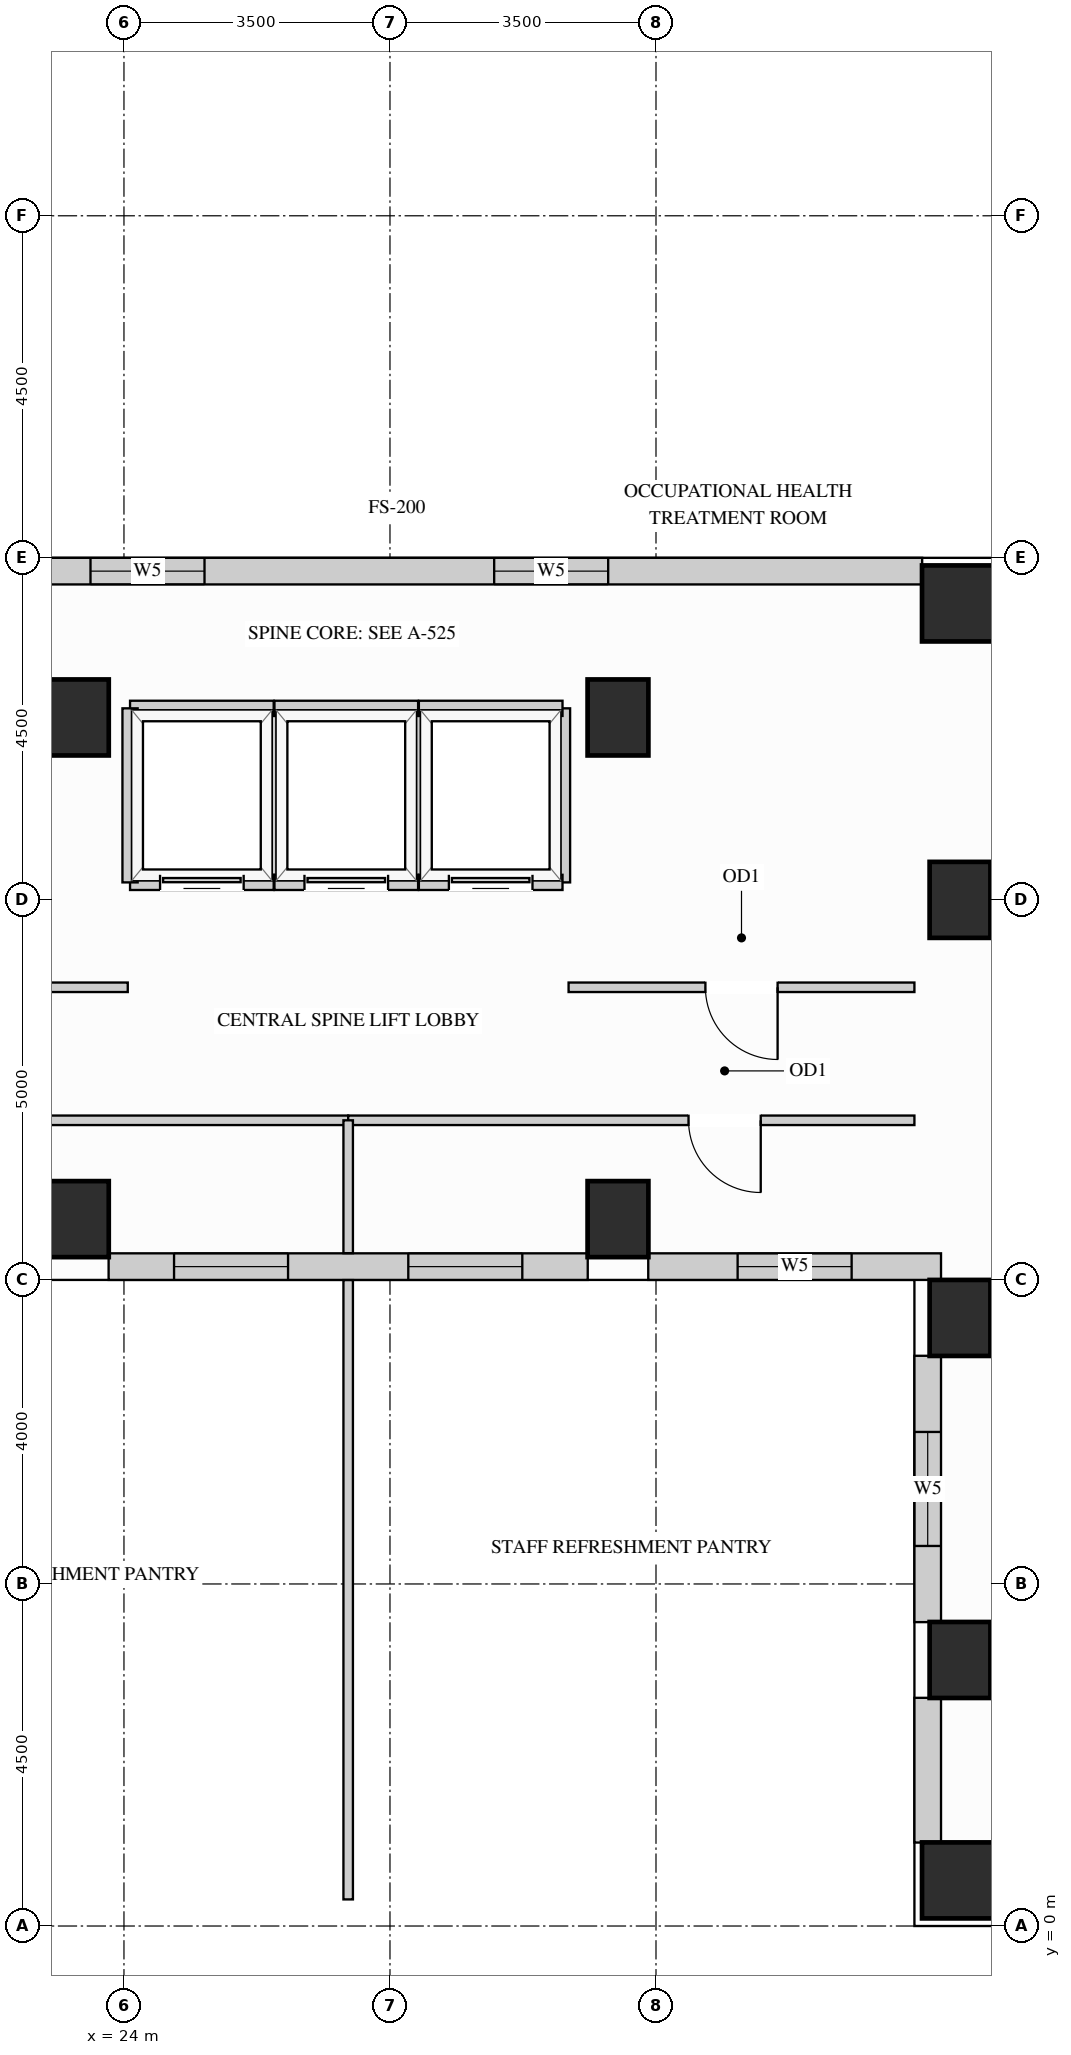
"""IFC4 building model, lengths in metres.
Left out: names, types, materials, properties, quantities, classifications, styles, units other than length and angle.
Written with IfcOpenShell. Run it as: python <this file> out.ifc"""

import sys

from ifc_helpers import new_model, si_unit, direction, frame, frame_2d, origin, origin_2d, place, context, subcontext, project, spatial, rectangle, extrude, source, transform, mapped, element, fill, save


model = new_model("IFC4")
c1 = context("Model", 3, precision=1e-05, world=origin(), true_north=direction((0.0, 1.0)))
c2 = subcontext(c1, "Body", "Model", "MODEL_VIEW")
j1 = project(units=[si_unit("LENGTHUNIT", "METRE"), si_unit("PLANEANGLEUNIT", "RADIAN")], contexts=[c1])
p1 = place(None, origin())
s1 = spatial("IfcSite", under=j1, at=p1, CompositionType="ELEMENT")
p2 = place(p1, origin())
s2 = spatial("IfcBuilding", under=s1, at=p2, CompositionType="ELEMENT")
p3 = place(p2, frame((0.0, 0.0, 182.7)))
s3 = spatial("IfcBuildingStorey", under=s2, at=p3, CompositionType="ELEMENT", Elevation=182.7)
m1 = source(origin(), c2, "Body", "SweptSolid", [
    extrude(rectangle(XDim=0.8, YDim=1.0, at=origin_2d()), origin(), (0.0, 0.0, 1.0), 3.4),
])
for number, where, z_axis, x_axis in (
    (1, (35.0, 13.5, 0.0), (0.0, 0.0, 1.0), (1.0, 0.0, 0.0)),
    (2, (35.0, 3.5, 0.0), (0.0, 0.0, 1.0), (1.0, 0.0, 0.0)),
    (3, (35.0, 8.0, 0.0), (0.0, 0.0, 1.0), (1.0, 0.0, 0.0)),
    (4, (23.4, 15.9, 0.0), (0.0, 0.0, 1.0), (1.0, 0.0, 0.0)),
    (5, (23.4, 9.3, 0.0), (0.0, 0.0, 1.0), (1.0, 0.0, 0.0)),
    (6, (30.5, 15.9, 0.0), (0.0, 0.0, 1.0), (1.0, 0.0, 0.0)),
    (7, (30.5, 9.3, 0.0), (0.0, 0.0, 1.0), (1.0, 0.0, 0.0)),
):
    element("IfcColumn", number, at=place(p3, frame(where, z_axis=z_axis, x_axis=x_axis)), inside=s3, PredefinedType="COLUMN", context=c2, shape_type="MappedRepresentation", body=[
        mapped(m1, transform((0.0, 0.0, 0.0), x_axis=(1.0, 0.0, 0.0), y_axis=(0.0, 1.0, 0.0), z_axis=(0.0, 0.0, 1.0))),
    ])
m2 = source(origin(), c2, "Body", "SweptSolid", [
    extrude(rectangle(XDim=1.0, YDim=1.0, at=origin_2d()), origin(), (0.0, 0.0, 1.0), 3.4),
])
for number, where, z_axis, x_axis in (
    (8, (35.0, 17.4, 0.0), (0.0, 0.0, 1.0), (1.0, 0.0, 0.0)),
    (9, (35.0, 0.6, 0.0), (0.0, 0.0, 1.0), (1.0, 0.0, 0.0)),
):
    element("IfcColumn", number, at=place(p3, frame(where, z_axis=z_axis, x_axis=x_axis)), inside=s3, PredefinedType="COLUMN", context=c2, shape_type="MappedRepresentation", body=[
        mapped(m2, transform((0.0, 0.0, 0.0), x_axis=(1.0, 0.0, 0.0), y_axis=(0.0, 1.0, 0.0), z_axis=(0.0, 0.0, 1.0))),
    ])
p4 = place(p3, frame((23.798, 8.675, 0.0), z_axis=(0.0, 0.0, 1.0), x_axis=(1.0, 0.0, 0.0)))
e10 = element("IfcWall", 10, at=p4, inside=s3, PredefinedType="SOLIDWALL", context=c2, shape_type="SweptSolid", body=[
    extrude(rectangle(XDim=6.304, YDim=0.35, at=frame_2d((3.152, 0.0))), origin(), (0.0, 0.0, 1.0), 3.385),
])
p5 = place(p4, frame((0.861, 0.0, 0.78)))
e11 = element("IfcOpeningElement", 11, at=p5, cuts=e10, PredefinedType="OPENING", context=c2, shape_type="SweptSolid", body=[
    extrude(rectangle(XDim=1.5, YDim=2.0, at=frame_2d((0.75, 1.0))), frame((0.0, 0.185, 0.0), z_axis=(0.0, -1.0, 0.0), x_axis=(1.0, 0.0, 0.0)), (0.0, 0.0, 1.0), 0.37),
])
p6 = place(p4, frame((3.943, 0.0, 0.78)))
e12 = element("IfcOpeningElement", 12, at=p6, cuts=e10, PredefinedType="OPENING", context=c2, shape_type="SweptSolid", body=[
    extrude(rectangle(XDim=1.5, YDim=2.0, at=frame_2d((0.75, 1.0))), frame((0.0, 0.185, 0.0), z_axis=(0.0, -1.0, 0.0), x_axis=(1.0, 0.0, 0.0)), (0.0, 0.0, 1.0), 0.37),
])
p7 = place(p3, frame((30.898, 8.675, 0.0), z_axis=(0.0, 0.0, 1.0), x_axis=(1.0, 0.0, 0.0)))
e13 = element("IfcWall", 13, at=p7, inside=s3, PredefinedType="SOLIDWALL", context=c2, shape_type="SweptSolid", body=[
    extrude(rectangle(XDim=3.852, YDim=0.35, at=frame_2d((1.926, 0.0))), origin(), (0.0, 0.0, 1.0), 3.385),
])
p8 = place(p7, frame((1.176, 0.0, 0.78)))
e14 = element("IfcOpeningElement", 14, at=p8, cuts=e13, PredefinedType="OPENING", context=c2, shape_type="SweptSolid", body=[
    extrude(rectangle(XDim=1.5, YDim=2.0, at=frame_2d((0.75, 1.0))), frame((0.0, 0.185, 0.0), z_axis=(0.0, -1.0, 0.0), x_axis=(1.0, 0.0, 0.0)), (0.0, 0.0, 1.0), 0.37),
])
p9 = place(p3, frame((34.575, 7.502, 0.0), z_axis=(0.0, 0.0, 1.0), x_axis=(0.0, -1.0, 0.0)))
e15 = element("IfcWall", 15, at=p9, inside=s3, PredefinedType="SOLIDWALL", context=c2, shape_type="SweptSolid", body=[
    extrude(rectangle(XDim=3.504, YDim=0.35, at=frame_2d((1.752, 0.0))), origin(), (0.0, 0.0, 1.0), 2.612),
])
p10 = place(p9, frame((1.002, 0.0, 0.78)))
e16 = element("IfcOpeningElement", 16, at=p10, cuts=e15, PredefinedType="OPENING", context=c2, shape_type="SweptSolid", body=[
    extrude(rectangle(XDim=1.5, YDim=1.652, at=frame_2d((0.75, 0.826))), frame((0.0, 0.185, 0.0), z_axis=(0.0, -1.0, 0.0), x_axis=(1.0, 0.0, 0.0)), (0.0, 0.0, 1.0), 0.37),
])
m3 = source(origin(), c2, "Body", "SweptSolid", [
    extrude(rectangle(XDim=1.904, YDim=0.35, at=frame_2d((0.952, 0.0))), origin(), (0.0, 0.0, 1.0), 2.612),
])
p11 = place(p3, frame((34.575, 3.002, 0.0), z_axis=(0.0, 0.0, 1.0), x_axis=(0.0, -1.0, 0.0)))
e17 = element("IfcWall", 17, at=p11, inside=s3, PredefinedType="SOLIDWALL", context=c2, shape_type="MappedRepresentation", body=[
    mapped(m3, transform((0.0, 0.0, 0.0), x_axis=(1.0, 0.0, 0.0), y_axis=(0.0, 1.0, 0.0), z_axis=(0.0, 0.0, 1.0))),
])
p12 = place(p3, frame((34.502, 17.825, 0.0), z_axis=(0.0, 0.0, 1.0), x_axis=(-1.0, 0.0, 0.0)))
e18 = element("IfcWall", 18, at=p12, inside=s3, PredefinedType="SOLIDWALL", context=c2, shape_type="SweptSolid", body=[
    extrude(rectangle(XDim=15.104, YDim=0.35, at=frame_2d((7.552, 0.0))), origin(), (0.0, 0.0, 1.0), 3.385),
])
p13 = place(p12, frame((4.131, 0.0, 0.78)))
e19 = element("IfcOpeningElement", 19, at=p13, cuts=e18, PredefinedType="OPENING", context=c2, shape_type="SweptSolid", body=[
    extrude(rectangle(XDim=1.5, YDim=2.0, at=frame_2d((0.75, 1.0))), frame((0.0, 0.185, 0.0), z_axis=(0.0, -1.0, 0.0), x_axis=(1.0, 0.0, 0.0)), (0.0, 0.0, 1.0), 0.37),
])
p14 = place(p12, frame((9.442, 0.0, 0.78)))
e20 = element("IfcOpeningElement", 20, at=p14, cuts=e18, PredefinedType="OPENING", context=c2, shape_type="SweptSolid", body=[
    extrude(rectangle(XDim=1.5, YDim=2.0, at=frame_2d((0.75, 1.0))), frame((0.0, 0.185, 0.0), z_axis=(0.0, -1.0, 0.0), x_axis=(1.0, 0.0, 0.0)), (0.0, 0.0, 1.0), 0.37),
])
p15 = place(p3, frame((29.85, 12.35, 0.0), z_axis=(0.0, 0.0, 1.0), x_axis=(1.0, 0.0, 0.0)))
e21 = element("IfcWall", 21, at=p15, inside=s3, PredefinedType="PARTITIONING", context=c2, shape_type="SweptSolid", body=[
    extrude(rectangle(XDim=4.55, YDim=0.125, at=frame_2d((2.275, 0.0))), origin(), (0.0, 0.0, 1.0), 3.385),
])
p16 = place(p15, frame((1.8, 0.0, 0.0)))
e22 = element("IfcOpeningElement", 22, at=p16, cuts=e21, PredefinedType="OPENING", context=c2, shape_type="SweptSolid", body=[
    extrude(rectangle(XDim=0.95, YDim=2.15, at=frame_2d((0.475, 1.075))), frame((0.0, 0.073, 0.0), z_axis=(0.0, -1.0, 0.0), x_axis=(1.0, 0.0, 0.0)), (0.0, 0.0, 1.0), 0.145),
])
p17 = place(p3, frame((19.5, 12.35, 0.0), z_axis=(0.0, 0.0, 1.0), x_axis=(1.0, 0.0, 0.0)))
e23 = element("IfcWall", 23, at=p17, inside=s3, PredefinedType="PARTITIONING", context=c2, shape_type="SweptSolid", body=[
    extrude(rectangle(XDim=4.55, YDim=0.125, at=frame_2d((2.275, 0.0))), origin(), (0.0, 0.0, 1.0), 3.385),
])
p18 = place(p17, frame((1.8, 0.0, 0.0)))
e24 = element("IfcOpeningElement", 24, at=p18, cuts=e23, PredefinedType="OPENING", context=c2, shape_type="SweptSolid", body=[
    extrude(rectangle(XDim=0.95, YDim=2.15, at=frame_2d((0.475, 1.075))), frame((0.0, 0.073, 0.0), z_axis=(0.0, -1.0, 0.0), x_axis=(1.0, 0.0, 0.0)), (0.0, 0.0, 1.0), 0.145),
])
p19 = place(p3, frame((19.5, 10.6, 0.0), z_axis=(0.0, 0.0, 1.0), x_axis=(1.0, 0.0, 0.0)))
e25 = element("IfcWall", 25, at=p19, inside=s3, PredefinedType="PARTITIONING", context=c2, shape_type="SweptSolid", body=[
    extrude(rectangle(XDim=7.45, YDim=0.125, at=frame_2d((3.725, 0.0))), origin(), (0.0, 0.0, 1.0), 3.385),
])
p20 = place(p19, frame((2.022, 0.0, 0.0)))
e26 = element("IfcOpeningElement", 26, at=p20, cuts=e25, PredefinedType="OPENING", context=c2, shape_type="SweptSolid", body=[
    extrude(rectangle(XDim=0.95, YDim=2.15, at=frame_2d((0.475, 1.075))), frame((0.0, 0.073, 0.0), z_axis=(0.0, -1.0, 0.0), x_axis=(1.0, 0.0, 0.0)), (0.0, 0.0, 1.0), 0.145),
])
p21 = place(p3, frame((26.95, 10.6, 0.0), z_axis=(0.0, 0.0, 1.0), x_axis=(1.0, 0.0, 0.0)))
e27 = element("IfcWall", 27, at=p21, inside=s3, PredefinedType="PARTITIONING", context=c2, shape_type="SweptSolid", body=[
    extrude(rectangle(XDim=7.45, YDim=0.125, at=frame_2d((3.725, 0.0))), origin(), (0.0, 0.0, 1.0), 3.385),
])
p22 = place(p21, frame((4.478, 0.0, 0.0)))
e28 = element("IfcOpeningElement", 28, at=p22, cuts=e27, PredefinedType="OPENING", context=c2, shape_type="SweptSolid", body=[
    extrude(rectangle(XDim=0.95, YDim=2.15, at=frame_2d((0.475, 1.075))), frame((0.0, 0.073, 0.0), z_axis=(0.0, -1.0, 0.0), x_axis=(1.0, 0.0, 0.0)), (0.0, 0.0, 1.0), 0.145),
])
m4 = source(origin(), c2, "Body", "SweptSolid", [
    extrude(rectangle(XDim=8.148, YDim=0.125, at=frame_2d((4.074, 0.0))), origin(), (0.0, 0.0, 1.0), 3.385),
])
p23 = place(p3, frame((26.95, 0.35, 0.0), z_axis=(0.0, 0.0, 1.0), x_axis=(0.0, 1.0, 0.0)))
e29 = element("IfcWall", 29, at=p23, inside=s3, PredefinedType="PARTITIONING", context=c2, shape_type="MappedRepresentation", body=[
    mapped(m4, transform((0.0, 0.0, 0.0), x_axis=(1.0, 0.0, 0.0), y_axis=(0.0, 1.0, 0.0), z_axis=(0.0, 0.0, 1.0))),
])
m5 = source(origin(), c2, "Body", "SweptSolid", [
    extrude(rectangle(XDim=1.748, YDim=0.125, at=frame_2d((0.874, 0.0))), origin(), (0.0, 0.0, 1.0), 3.385),
])
p24 = place(p3, frame((26.95, 8.852, 0.0), z_axis=(0.0, 0.0, 1.0), x_axis=(0.0, 1.0, 0.0)))
e30 = element("IfcWall", 30, at=p24, inside=s3, PredefinedType="PARTITIONING", context=c2, shape_type="MappedRepresentation", body=[
    mapped(m5, transform((0.0, 0.0, 0.0), x_axis=(1.0, 0.0, 0.0), y_axis=(0.0, 1.0, 0.0), z_axis=(0.0, 0.0, 1.0))),
])
m6 = source(origin(), c2, "Body", "SweptSolid", [
    extrude(rectangle(XDim=2.29, YDim=0.2, at=frame_2d((1.145, 0.0))), origin(), (0.0, 0.0, 1.0), 3.385),
])
p25 = place(p3, frame((25.97, 13.73, 0.0), z_axis=(0.0, 0.0, 1.0), x_axis=(0.0, 1.0, 0.0)))
e31 = element("IfcWall", 31, at=p25, inside=s3, PredefinedType="PARTITIONING", context=c2, shape_type="MappedRepresentation", body=[
    mapped(m6, transform((0.0, 0.0, 0.0), x_axis=(1.0, 0.0, 0.0), y_axis=(0.0, 1.0, 0.0), z_axis=(0.0, 0.0, 1.0))),
])
m7 = source(origin(), c2, "Body", "SweptSolid", [
    extrude(rectangle(XDim=1.89, YDim=0.2, at=frame_2d((0.945, 0.0))), origin(), (0.0, 0.0, 1.0), 2.773),
])
p26 = place(p3, frame((24.08, 16.02, 0.0), z_axis=(0.0, 0.0, 1.0), x_axis=(1.0, 0.0, 0.0)))
e32 = element("IfcWall", 32, at=p26, inside=s3, PredefinedType="PARTITIONING", context=c2, shape_type="MappedRepresentation", body=[
    mapped(m7, transform((0.0, 0.0, 0.0), x_axis=(1.0, 0.0, 0.0), y_axis=(0.0, 1.0, 0.0), z_axis=(0.0, 0.0, 1.0))),
])
p27 = place(p3, frame((24.08, 13.73, 0.0), z_axis=(0.0, 0.0, 1.0), x_axis=(1.0, 0.0, 0.0)))
e33 = element("IfcWall", 33, at=p27, inside=s3, PredefinedType="PARTITIONING", context=c2, shape_type="SweptSolid", body=[
    extrude(rectangle(XDim=1.89, YDim=0.2, at=frame_2d((0.945, 0.0))), origin(), (0.0, 0.0, 1.0), 2.466),
])
p28 = place(p27, frame((0.395, 0.0, 0.0)))
e34 = element("IfcOpeningElement", 34, at=p28, cuts=e33, PredefinedType="OPENING", context=c2, shape_type="SweptSolid", body=[
    extrude(rectangle(XDim=1.1, YDim=2.2, at=frame_2d((0.55, 1.1))), frame((0.0, 0.11, 0.0), z_axis=(0.0, -1.0, 0.0), x_axis=(1.0, 0.0, 0.0)), (0.0, 0.0, 1.0), 0.22),
])
for number, where, z_axis, x_axis in (
    (35, (24.08, 13.73, 0.0), (0.0, 0.0, 1.0), (0.0, 1.0, 0.0)),
    (36, (27.87, 13.73, 0.0), (0.0, 0.0, 1.0), (0.0, 1.0, 0.0)),
):
    element("IfcWall", number, at=place(p3, frame(where, z_axis=z_axis, x_axis=x_axis)), inside=s3, PredefinedType="PARTITIONING", context=c2, shape_type="MappedRepresentation", body=[
        mapped(m6, transform((0.0, 0.0, 0.0), x_axis=(1.0, 0.0, 0.0), y_axis=(0.0, 1.0, 0.0), z_axis=(0.0, 0.0, 1.0))),
    ])
m8 = source(origin(), c2, "Body", "SweptSolid", [
    extrude(rectangle(XDim=1.89, YDim=0.2, at=frame_2d((0.945, 0.0))), origin(), (0.0, 0.0, 1.0), 2.773),
])
p29 = place(p3, frame((25.98, 16.02, 0.0), z_axis=(0.0, 0.0, 1.0), x_axis=(1.0, 0.0, 0.0)))
e37 = element("IfcWall", 37, at=p29, inside=s3, PredefinedType="PARTITIONING", context=c2, shape_type="MappedRepresentation", body=[
    mapped(m8, transform((0.0, 0.0, 0.0), x_axis=(1.0, 0.0, 0.0), y_axis=(0.0, 1.0, 0.0), z_axis=(0.0, 0.0, 1.0))),
])
p30 = place(p3, frame((25.98, 13.73, 0.0), z_axis=(0.0, 0.0, 1.0), x_axis=(1.0, 0.0, 0.0)))
e38 = element("IfcWall", 38, at=p30, inside=s3, PredefinedType="PARTITIONING", context=c2, shape_type="SweptSolid", body=[
    extrude(rectangle(XDim=1.89, YDim=0.2, at=frame_2d((0.945, 0.0))), origin(), (0.0, 0.0, 1.0), 2.466),
])
p31 = place(p30, frame((0.395, 0.0, 0.0)))
e39 = element("IfcOpeningElement", 39, at=p31, cuts=e38, PredefinedType="OPENING", context=c2, shape_type="SweptSolid", body=[
    extrude(rectangle(XDim=1.1, YDim=2.2, at=frame_2d((0.55, 1.1))), frame((0.0, 0.11, 0.0), z_axis=(0.0, -1.0, 0.0), x_axis=(1.0, 0.0, 0.0)), (0.0, 0.0, 1.0), 0.22),
])
p32 = place(p3, frame((29.77, 13.73, 0.0), z_axis=(0.0, 0.0, 1.0), x_axis=(0.0, 1.0, 0.0)))
e40 = element("IfcWall", 40, at=p32, inside=s3, PredefinedType="PARTITIONING", context=c2, shape_type="MappedRepresentation", body=[
    mapped(m6, transform((0.0, 0.0, 0.0), x_axis=(1.0, 0.0, 0.0), y_axis=(0.0, 1.0, 0.0), z_axis=(0.0, 0.0, 1.0))),
])
p33 = place(p3, frame((27.88, 16.02, 0.0), z_axis=(0.0, 0.0, 1.0), x_axis=(1.0, 0.0, 0.0)))
e41 = element("IfcWall", 41, at=p33, inside=s3, PredefinedType="PARTITIONING", context=c2, shape_type="MappedRepresentation", body=[
    mapped(m8, transform((0.0, 0.0, 0.0), x_axis=(1.0, 0.0, 0.0), y_axis=(0.0, 1.0, 0.0), z_axis=(0.0, 0.0, 1.0))),
])
p34 = place(p3, frame((27.88, 13.73, 0.0), z_axis=(0.0, 0.0, 1.0), x_axis=(1.0, 0.0, 0.0)))
e42 = element("IfcWall", 42, at=p34, inside=s3, PredefinedType="PARTITIONING", context=c2, shape_type="SweptSolid", body=[
    extrude(rectangle(XDim=1.89, YDim=0.2, at=frame_2d((0.945, 0.0))), origin(), (0.0, 0.0, 1.0), 2.466),
])
p35 = place(p34, frame((0.395, 0.0, 0.0)))
e43 = element("IfcOpeningElement", 43, at=p35, cuts=e42, PredefinedType="OPENING", context=c2, shape_type="SweptSolid", body=[
    extrude(rectangle(XDim=1.1, YDim=2.2, at=frame_2d((0.55, 1.1))), frame((0.0, 0.11, 0.0), z_axis=(0.0, -1.0, 0.0), x_axis=(1.0, 0.0, 0.0)), (0.0, 0.0, 1.0), 0.22),
])
m9 = source(origin(), c2, "Body", "SweptSolid", [
    extrude(rectangle(XDim=1.1, YDim=2.2, at=frame_2d((0.55, 1.1))), frame((0.0, 0.025, 0.0), z_axis=(0.0, -1.0, 0.0), x_axis=(1.0, 0.0, 0.0)), (0.0, 0.0, 1.0), 0.05),
])
p36 = place(p28, origin())
e44 = element("IfcDoor", 44, at=p36, inside=s3, OperationType="SLIDING_TO_LEFT", PredefinedType="DOOR", context=c2, shape_type="MappedRepresentation", body=[
    mapped(m9, transform((0.0, 0.0, 0.0), x_axis=(1.0, 0.0, 0.0), y_axis=(0.0, 1.0, 0.0), z_axis=(0.0, 0.0, 1.0))),
])
fill(e34, e44)
p37 = place(p31, origin())
e45 = element("IfcDoor", 45, at=p37, inside=s3, OperationType="SLIDING_TO_LEFT", PredefinedType="DOOR", context=c2, shape_type="MappedRepresentation", body=[
    mapped(m9, transform((0.0, 0.0, 0.0), x_axis=(1.0, 0.0, 0.0), y_axis=(0.0, 1.0, 0.0), z_axis=(0.0, 0.0, 1.0))),
])
fill(e39, e45)
p38 = place(p35, origin())
e46 = element("IfcDoor", 46, at=p38, inside=s3, OperationType="SLIDING_TO_LEFT", PredefinedType="DOOR", context=c2, shape_type="MappedRepresentation", body=[
    mapped(m9, transform((0.0, 0.0, 0.0), x_axis=(1.0, 0.0, 0.0), y_axis=(0.0, 1.0, 0.0), z_axis=(0.0, 0.0, 1.0))),
])
fill(e43, e46)
m10 = source(origin(), c2, "Body", "SweptSolid", [
    extrude(rectangle(XDim=0.95, YDim=2.15, at=frame_2d((0.475, 1.075))), frame((0.0, 0.025, 0.0), z_axis=(0.0, -1.0, 0.0), x_axis=(1.0, 0.0, 0.0)), (0.0, 0.0, 1.0), 0.05),
])
p39 = place(p16, origin())
e47 = element("IfcDoor", 47, at=p39, inside=s3, OperationType="SINGLE_SWING_RIGHT", PredefinedType="DOOR", context=c2, shape_type="MappedRepresentation", body=[
    mapped(m10, transform((0.0, 0.0, 0.0), x_axis=(1.0, 0.0, 0.0), y_axis=(0.0, 1.0, 0.0), z_axis=(0.0, 0.0, 1.0))),
])
fill(e22, e47)
p40 = place(p22, origin())
e48 = element("IfcDoor", 48, at=p40, inside=s3, OperationType="SINGLE_SWING_RIGHT", PredefinedType="DOOR", context=c2, shape_type="MappedRepresentation", body=[
    mapped(m10, transform((0.0, 0.0, 0.0), x_axis=(1.0, 0.0, 0.0), y_axis=(0.0, 1.0, 0.0), z_axis=(0.0, 0.0, 1.0))),
])
fill(e28, e48)
m11 = source(origin(), c2, "Body", "SweptSolid", [
    extrude(rectangle(XDim=1.5, YDim=2.0, at=frame_2d((0.75, 1.0))), frame((0.0, 0.03, 0.0), z_axis=(0.0, -1.0, 0.0), x_axis=(1.0, 0.0, 0.0)), (0.0, 0.0, 1.0), 0.06),
])
p41 = place(p5, origin())
e49 = element("IfcWindow", 49, at=p41, inside=s3, PartitioningType="SINGLE_PANEL", PredefinedType="WINDOW", context=c2, shape_type="MappedRepresentation", body=[
    mapped(m11, transform((0.0, 0.0, 0.0), x_axis=(1.0, 0.0, 0.0), y_axis=(0.0, 1.0, 0.0), z_axis=(0.0, 0.0, 1.0))),
])
fill(e11, e49)
p42 = place(p6, origin())
e50 = element("IfcWindow", 50, at=p42, inside=s3, PartitioningType="SINGLE_PANEL", PredefinedType="WINDOW", context=c2, shape_type="MappedRepresentation", body=[
    mapped(m11, transform((0.0, 0.0, 0.0), x_axis=(1.0, 0.0, 0.0), y_axis=(0.0, 1.0, 0.0), z_axis=(0.0, 0.0, 1.0))),
])
fill(e12, e50)
p43 = place(p8, origin())
e51 = element("IfcWindow", 51, at=p43, inside=s3, PartitioningType="SINGLE_PANEL", PredefinedType="WINDOW", context=c2, shape_type="MappedRepresentation", body=[
    mapped(m11, transform((0.0, 0.0, 0.0), x_axis=(1.0, 0.0, 0.0), y_axis=(0.0, 1.0, 0.0), z_axis=(0.0, 0.0, 1.0))),
])
fill(e14, e51)
m12 = source(origin(), c2, "Body", "SweptSolid", [
    extrude(rectangle(XDim=1.5, YDim=1.652, at=frame_2d((0.75, 0.826))), frame((0.0, 0.03, 0.0), z_axis=(0.0, -1.0, 0.0), x_axis=(1.0, 0.0, 0.0)), (0.0, 0.0, 1.0), 0.06),
])
p44 = place(p10, origin())
e52 = element("IfcWindow", 52, at=p44, inside=s3, PartitioningType="SINGLE_PANEL", PredefinedType="WINDOW", context=c2, shape_type="MappedRepresentation", body=[
    mapped(m12, transform((0.0, 0.0, 0.0), x_axis=(1.0, 0.0, 0.0), y_axis=(0.0, 1.0, 0.0), z_axis=(0.0, 0.0, 1.0))),
])
fill(e16, e52)
p45 = place(p13, origin())
e53 = element("IfcWindow", 53, at=p45, inside=s3, PartitioningType="SINGLE_PANEL", PredefinedType="WINDOW", context=c2, shape_type="MappedRepresentation", body=[
    mapped(m11, transform((0.0, 0.0, 0.0), x_axis=(1.0, 0.0, 0.0), y_axis=(0.0, 1.0, 0.0), z_axis=(0.0, 0.0, 1.0))),
])
fill(e19, e53)
p46 = place(p14, origin())
e54 = element("IfcWindow", 54, at=p46, inside=s3, PartitioningType="SINGLE_PANEL", PredefinedType="WINDOW", context=c2, shape_type="MappedRepresentation", body=[
    mapped(m11, transform((0.0, 0.0, 0.0), x_axis=(1.0, 0.0, 0.0), y_axis=(0.0, 1.0, 0.0), z_axis=(0.0, 0.0, 1.0))),
])
fill(e20, e54)
save(model, sys.argv[1])
